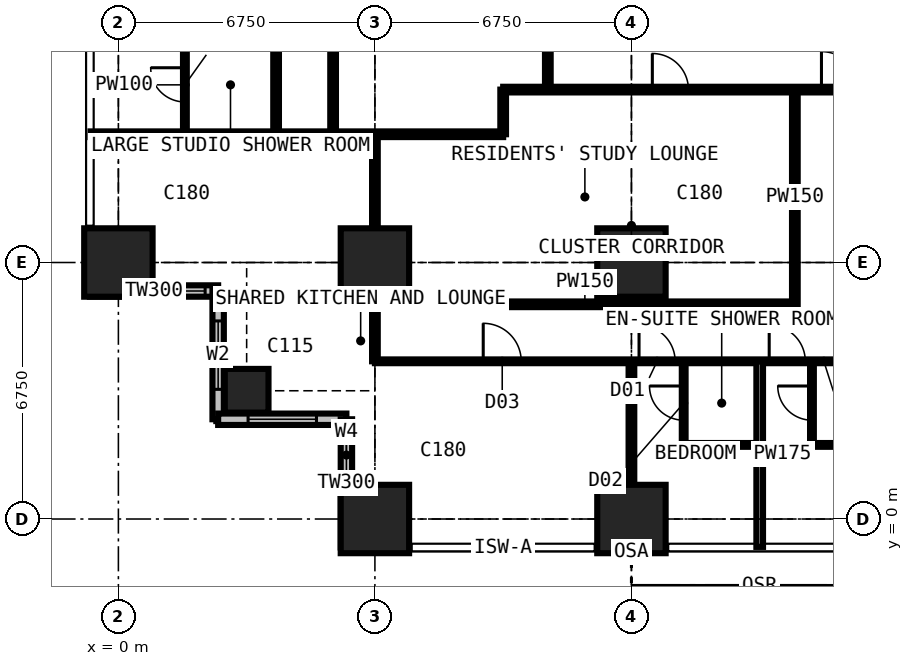
"""IFC4 building model, lengths in metres.
Left out: names, types, materials, properties, quantities, classifications, styles, units other than length and angle.
Written with IfcOpenShell. Run it as: python <this file> out.ifc"""

import sys

from ifc_helpers import new_model, si_unit, direction, frame, frame_2d, origin, origin_2d, place, context, subcontext, project, spatial, rectangle, extrude, element, fill, save


model = new_model("IFC4")
c1 = context("Model", 3, precision=1e-05, world=origin(), true_north=direction((0.0, 1.0)))
c2 = subcontext(c1, "Body", "Model", "MODEL_VIEW")
j1 = project(units=[si_unit("LENGTHUNIT", "METRE"), si_unit("PLANEANGLEUNIT", "RADIAN")], contexts=[c1])
p1 = place(None, origin())
s1 = spatial("IfcSite", under=j1, at=p1, CompositionType="ELEMENT")
p2 = place(p1, origin())
s2 = spatial("IfcBuilding", under=s1, at=p2, CompositionType="ELEMENT")
p3 = place(p2, frame((0.0, 0.0, 57.6)))
s3 = spatial("IfcBuildingStorey", under=s2, at=p3, CompositionType="ELEMENT", Elevation=57.6)
p4 = place(p3, frame((0.0, 6.75, 0.0), z_axis=(0.0, 0.0, 1.0), x_axis=(1.0, 0.0, 0.0)))
e1 = element("IfcColumn", 1, at=p4, inside=s3, PredefinedType="COLUMN", context=c2, shape_type="SweptSolid", body=[
    extrude(rectangle(XDim=1.8, YDim=1.8, at=origin_2d()), origin(), (0.0, 0.0, 1.0), 3.6),
])
p5 = place(p3, frame((3.375, 3.375, 0.0), z_axis=(0.0, 0.0, 1.0), x_axis=(1.0, 0.0, 0.0)))
e2 = element("IfcColumn", 2, at=p5, inside=s3, PredefinedType="COLUMN", context=c2, shape_type="SweptSolid", body=[
    extrude(rectangle(XDim=1.15, YDim=1.15, at=origin_2d()), origin(), (0.0, 0.0, 1.0), 3.6),
])
for number, where, z_axis, x_axis in (
    (3, (6.75, 0.0, 0.0), (0.0, 0.0, 1.0), (1.0, 0.0, 0.0)),
    (4, (6.75, 6.75, 0.0), (0.0, 0.0, 1.0), (1.0, 0.0, 0.0)),
    (5, (13.5, 0.0, 0.0), (0.0, 0.0, 1.0), (1.0, 0.0, 0.0)),
    (6, (13.5, 6.75, 0.0), (0.0, 0.0, 1.0), (1.0, 0.0, 0.0)),
):
    element("IfcColumn", number, at=place(p3, frame(where, z_axis=z_axis, x_axis=x_axis)), inside=s3, PredefinedType="COLUMN", context=c2, shape_type="SweptSolid", body=[
        extrude(rectangle(XDim=1.8, YDim=1.8, at=origin_2d()), origin(), (0.0, 0.0, 1.0), 3.6),
    ])
p6 = place(p3, frame((-0.75, 6.0, 0.0), z_axis=(0.0, 0.0, 1.0), x_axis=(1.0, 0.0, 0.0)))
e7 = element("IfcWall", 7, at=p6, inside=s3, PredefinedType="SOLIDWALL", context=c2, shape_type="SweptSolid", body=[
    extrude(rectangle(XDim=3.375, YDim=0.3, at=frame_2d((1.688, 0.0))), origin(), (0.0, 0.0, 1.0), 3.375),
])
p7 = place(p6, frame((1.833, 0.0, 0.9)))
e8 = element("IfcOpeningElement", 8, at=p7, cuts=e7, PredefinedType="OPENING", context=c2, shape_type="SweptSolid", body=[
    extrude(rectangle(XDim=1.2, YDim=1.8, at=frame_2d((0.6, 0.9))), frame((0.0, 0.16, 0.0), z_axis=(0.0, -1.0, 0.0), x_axis=(1.0, 0.0, 0.0)), (0.0, 0.0, 1.0), 0.32),
])
p8 = place(p3, frame((2.625, 6.0, 0.0), z_axis=(0.0, 0.0, 1.0), x_axis=(0.0, -1.0, 0.0)))
e9 = element("IfcWall", 9, at=p8, inside=s3, PredefinedType="SOLIDWALL", context=c2, shape_type="SweptSolid", body=[
    extrude(rectangle(XDim=3.375, YDim=0.3, at=frame_2d((1.688, 0.0))), origin(), (0.0, 0.0, 1.0), 3.375),
])
p9 = place(p8, frame((0.788, 0.0, 0.6)))
e10 = element("IfcOpeningElement", 10, at=p9, cuts=e9, PredefinedType="OPENING", context=c2, shape_type="SweptSolid", body=[
    extrude(rectangle(XDim=1.8, YDim=2.1, at=frame_2d((0.9, 1.05))), frame((0.0, 0.16, 0.0), z_axis=(0.0, -1.0, 0.0), x_axis=(1.0, 0.0, 0.0)), (0.0, 0.0, 1.0), 0.32),
])
p10 = place(p3, frame((2.625, 2.625, 0.0), z_axis=(0.0, 0.0, 1.0), x_axis=(1.0, 0.0, 0.0)))
e11 = element("IfcWall", 11, at=p10, inside=s3, PredefinedType="SOLIDWALL", context=c2, shape_type="SweptSolid", body=[
    extrude(rectangle(XDim=3.375, YDim=0.3, at=frame_2d((1.688, 0.0))), origin(), (0.0, 0.0, 1.0), 3.375),
])
p11 = place(p10, frame((0.788, 0.0, 0.6)))
e12 = element("IfcOpeningElement", 12, at=p11, cuts=e11, PredefinedType="OPENING", context=c2, shape_type="SweptSolid", body=[
    extrude(rectangle(XDim=1.8, YDim=2.1, at=frame_2d((0.9, 1.05))), frame((0.0, 0.16, 0.0), z_axis=(0.0, -1.0, 0.0), x_axis=(1.0, 0.0, 0.0)), (0.0, 0.0, 1.0), 0.32),
])
p12 = place(p3, frame((6.0, 2.625, 0.0), z_axis=(0.0, 0.0, 1.0), x_axis=(0.0, -1.0, 0.0)))
e13 = element("IfcWall", 13, at=p12, inside=s3, PredefinedType="SOLIDWALL", context=c2, shape_type="SweptSolid", body=[
    extrude(rectangle(XDim=3.375, YDim=0.3, at=frame_2d((1.688, 0.0))), origin(), (0.0, 0.0, 1.0), 3.375),
])
p13 = place(p12, frame((0.343, 0.0, 0.9)))
e14 = element("IfcOpeningElement", 14, at=p13, cuts=e13, PredefinedType="OPENING", context=c2, shape_type="SweptSolid", body=[
    extrude(rectangle(XDim=1.2, YDim=1.8, at=frame_2d((0.6, 0.9))), frame((0.0, 0.16, 0.0), z_axis=(0.0, -1.0, 0.0), x_axis=(1.0, 0.0, 0.0)), (0.0, 0.0, 1.0), 0.32),
])
p14 = place(p3, frame((-0.734, 10.125, 0.0), z_axis=(0.0, 0.0, 1.0), x_axis=(1.0, 0.0, 0.0)))
e15 = element("IfcWall", 15, at=p14, inside=s3, PredefinedType="PARTITIONING", context=c2, shape_type="SweptSolid", body=[
    extrude(rectangle(XDim=10.859, YDim=0.15, at=frame_2d((5.429, 0.0))), origin(), (0.0, 0.0, 1.0), 3.375),
])
p15 = place(p3, frame((1.75, 10.125, 0.0), z_axis=(0.0, 0.0, 1.0), x_axis=(0.0, 1.0, 0.0)))
e16 = element("IfcWall", 16, at=p15, inside=s3, PredefinedType="PARTITIONING", context=c2, shape_type="SweptSolid", body=[
    extrude(rectangle(XDim=2.6, YDim=0.1, at=frame_2d((1.3, 0.0))), origin(), (0.0, 0.0, 1.0), 3.375),
])
p16 = place(p15, frame((0.85, 0.0, 0.0)))
e17 = element("IfcOpeningElement", 17, at=p16, cuts=e16, PredefinedType="OPENING", context=c2, shape_type="SweptSolid", body=[
    extrude(rectangle(XDim=0.9, YDim=2.2, at=frame_2d((0.45, 1.1))), frame((0.0, 0.06, 0.0), z_axis=(0.0, -1.0, 0.0), x_axis=(1.0, 0.0, 0.0)), (0.0, 0.0, 1.0), 0.12),
])
p17 = place(p3, frame((4.15, 10.125, 0.0), z_axis=(0.0, 0.0, 1.0), x_axis=(0.0, 1.0, 0.0)))
e18 = element("IfcWall", 18, at=p17, inside=s3, PredefinedType="PARTITIONING", context=c2, shape_type="SweptSolid", body=[
    extrude(rectangle(XDim=23.625, YDim=0.15, at=frame_2d((11.812, 0.0))), origin(), (0.0, 0.0, 1.0), 3.375),
])
p18 = place(p17, frame((19.775, 0.0, 0.0)))
e19 = element("IfcOpeningElement", 19, at=p18, cuts=e18, PredefinedType="OPENING", context=c2, shape_type="SweptSolid", body=[
    extrude(rectangle(XDim=1.0, YDim=2.2, at=frame_2d((0.5, 1.1))), frame((0.0, 0.085, 0.0), z_axis=(0.0, -1.0, 0.0), x_axis=(1.0, 0.0, 0.0)), (0.0, 0.0, 1.0), 0.17),
])
p19 = place(p17, frame((13.7, 0.0, 0.0)))
e20 = element("IfcOpeningElement", 20, at=p19, cuts=e18, PredefinedType="OPENING", context=c2, shape_type="SweptSolid", body=[
    extrude(rectangle(XDim=0.95, YDim=2.2, at=frame_2d((0.475, 1.1))), frame((0.0, 0.085, 0.0), z_axis=(0.0, -1.0, 0.0), x_axis=(1.0, 0.0, 0.0)), (0.0, 0.0, 1.0), 0.17),
])
p20 = place(p17, frame((4.2, 0.0, 0.0)))
e21 = element("IfcOpeningElement", 21, at=p20, cuts=e18, PredefinedType="OPENING", context=c2, shape_type="SweptSolid", body=[
    extrude(rectangle(XDim=0.95, YDim=2.2, at=frame_2d((0.475, 1.1))), frame((0.0, 0.085, 0.0), z_axis=(0.0, -1.0, 0.0), x_axis=(1.0, 0.0, 0.0)), (0.0, 0.0, 1.0), 0.17),
])
p21 = place(p17, frame((10.95, 0.0, 0.0)))
e22 = element("IfcOpeningElement", 22, at=p21, cuts=e18, PredefinedType="OPENING", context=c2, shape_type="SweptSolid", body=[
    extrude(rectangle(XDim=0.95, YDim=2.2, at=frame_2d((0.475, 1.1))), frame((0.0, 0.085, 0.0), z_axis=(0.0, -1.0, 0.0), x_axis=(1.0, 0.0, 0.0)), (0.0, 0.0, 1.0), 0.17),
])
p22 = place(p3, frame((5.65, 10.125, 0.0), z_axis=(0.0, 0.0, 1.0), x_axis=(0.0, 1.0, 0.0)))
e23 = element("IfcWall", 23, at=p22, inside=s3, PredefinedType="PARTITIONING", context=c2, shape_type="SweptSolid", body=[
    extrude(rectangle(XDim=10.762, YDim=0.15, at=frame_2d((5.381, 0.0))), origin(), (0.0, 0.0, 1.0), 3.375),
])
p23 = place(p22, frame((4.9, 0.0, 0.0)))
e24 = element("IfcOpeningElement", 24, at=p23, cuts=e23, PredefinedType="OPENING", context=c2, shape_type="SweptSolid", body=[
    extrude(rectangle(XDim=0.95, YDim=2.2, at=frame_2d((0.475, 1.1))), frame((0.0, 0.085, 0.0), z_axis=(0.0, -1.0, 0.0), x_axis=(1.0, 0.0, 0.0)), (0.0, 0.0, 1.0), 0.17),
])
p24 = place(p3, frame((6.75, 4.15, 0.0), z_axis=(0.0, 0.0, 1.0), x_axis=(0.0, 1.0, 0.0)))
e25 = element("IfcWall", 25, at=p24, inside=s3, PredefinedType="PARTITIONING", context=c2, shape_type="SweptSolid", body=[
    extrude(rectangle(XDim=5.975, YDim=0.15, at=frame_2d((2.988, 0.0))), origin(), (0.0, 0.0, 1.0), 2.877),
])
p25 = place(p3, frame((6.75, 4.15, 0.0), z_axis=(0.0, 0.0, 1.0), x_axis=(1.0, 0.0, 0.0)))
e26 = element("IfcWall", 26, at=p25, inside=s3, PredefinedType="PARTITIONING", context=c2, shape_type="SweptSolid", body=[
    extrude(rectangle(XDim=23.625, YDim=0.1, at=frame_2d((11.812, 0.0))), origin(), (0.0, 0.0, 1.0), 3.375),
])
p26 = place(p25, frame((2.85, 0.0, 0.0)))
e27 = element("IfcOpeningElement", 27, at=p26, cuts=e26, PredefinedType="OPENING", context=c2, shape_type="SweptSolid", body=[
    extrude(rectangle(XDim=1.0, YDim=2.2, at=frame_2d((0.5, 1.1))), frame((0.0, 0.06, 0.0), z_axis=(0.0, -1.0, 0.0), x_axis=(1.0, 0.0, 0.0)), (0.0, 0.0, 1.0), 0.12),
])
p27 = place(p25, frame((6.95, 0.0, 0.0)))
e28 = element("IfcOpeningElement", 28, at=p27, cuts=e26, PredefinedType="OPENING", context=c2, shape_type="SweptSolid", body=[
    extrude(rectangle(XDim=0.95, YDim=2.2, at=frame_2d((0.475, 1.1))), frame((0.0, 0.06, 0.0), z_axis=(0.0, -1.0, 0.0), x_axis=(1.0, 0.0, 0.0)), (0.0, 0.0, 1.0), 0.12),
])
p28 = place(p25, frame((10.375, 0.0, 0.0)))
e29 = element("IfcOpeningElement", 29, at=p28, cuts=e26, PredefinedType="OPENING", context=c2, shape_type="SweptSolid", body=[
    extrude(rectangle(XDim=0.95, YDim=2.2, at=frame_2d((0.475, 1.1))), frame((0.0, 0.06, 0.0), z_axis=(0.0, -1.0, 0.0), x_axis=(1.0, 0.0, 0.0)), (0.0, 0.0, 1.0), 0.12),
])
p29 = place(p25, frame((18.475, 0.0, 0.0)))
e30 = element("IfcOpeningElement", 30, at=p29, cuts=e26, PredefinedType="OPENING", context=c2, shape_type="SweptSolid", body=[
    extrude(rectangle(XDim=0.95, YDim=2.2, at=frame_2d((0.475, 1.1))), frame((0.0, 0.06, 0.0), z_axis=(0.0, -1.0, 0.0), x_axis=(1.0, 0.0, 0.0)), (0.0, 0.0, 1.0), 0.12),
])
p30 = place(p25, frame((13.7, 0.0, 0.0)))
e31 = element("IfcOpeningElement", 31, at=p30, cuts=e26, PredefinedType="OPENING", context=c2, shape_type="SweptSolid", body=[
    extrude(rectangle(XDim=0.95, YDim=2.2, at=frame_2d((0.475, 1.1))), frame((0.0, 0.06, 0.0), z_axis=(0.0, -1.0, 0.0), x_axis=(1.0, 0.0, 0.0)), (0.0, 0.0, 1.0), 0.12),
])
p31 = place(p3, frame((6.75, 5.65, 0.0), z_axis=(0.0, 0.0, 1.0), x_axis=(1.0, 0.0, 0.0)))
e32 = element("IfcWall", 32, at=p31, inside=s3, PredefinedType="PARTITIONING", context=c2, shape_type="SweptSolid", body=[
    extrude(rectangle(XDim=11.05, YDim=0.15, at=frame_2d((5.525, 0.0))), origin(), (0.0, 0.0, 1.0), 3.375),
])
p32 = place(p3, frame((10.125, 10.125, 0.0), z_axis=(0.0, 0.0, 1.0), x_axis=(0.0, 1.0, 0.0)))
e33 = element("IfcWall", 33, at=p32, inside=s3, PredefinedType="PARTITIONING", context=c2, shape_type="SweptSolid", body=[
    extrude(rectangle(XDim=1.175, YDim=0.15, at=frame_2d((0.587, 0.0))), origin(), (0.0, 0.0, 1.0), 3.375),
])
p33 = place(p3, frame((10.125, 11.3, 0.0), z_axis=(0.0, 0.0, 1.0), x_axis=(1.0, 0.0, 0.0)))
e34 = element("IfcWall", 34, at=p33, inside=s3, PredefinedType="PARTITIONING", context=c2, shape_type="SweptSolid", body=[
    extrude(rectangle(XDim=20.675, YDim=0.15, at=frame_2d((10.337, 0.0))), origin(), (0.0, 0.0, 1.0), 3.375),
])
p34 = place(p33, frame((8.375, 0.0, 0.0)))
e35 = element("IfcOpeningElement", 35, at=p34, cuts=e34, PredefinedType="OPENING", context=c2, shape_type="SweptSolid", body=[
    extrude(rectangle(XDim=1.0, YDim=2.2, at=frame_2d((0.5, 1.1))), frame((0.0, 0.085, 0.0), z_axis=(0.0, -1.0, 0.0), x_axis=(1.0, 0.0, 0.0)), (0.0, 0.0, 1.0), 0.17),
])
p35 = place(p33, frame((10.975, 0.0, 0.0)))
e36 = element("IfcOpeningElement", 36, at=p35, cuts=e34, PredefinedType="OPENING", context=c2, shape_type="SweptSolid", body=[
    extrude(rectangle(XDim=1.0, YDim=2.2, at=frame_2d((0.5, 1.1))), frame((0.0, 0.085, 0.0), z_axis=(0.0, -1.0, 0.0), x_axis=(1.0, 0.0, 0.0)), (0.0, 0.0, 1.0), 0.17),
])
p36 = place(p33, frame((3.925, 0.0, 0.0)))
e37 = element("IfcOpeningElement", 37, at=p36, cuts=e34, PredefinedType="OPENING", context=c2, shape_type="SweptSolid", body=[
    extrude(rectangle(XDim=0.95, YDim=2.2, at=frame_2d((0.475, 1.1))), frame((0.0, 0.085, 0.0), z_axis=(0.0, -1.0, 0.0), x_axis=(1.0, 0.0, 0.0)), (0.0, 0.0, 1.0), 0.17),
])
p37 = place(p3, frame((11.3, 11.3, 0.0), z_axis=(0.0, 0.0, 1.0), x_axis=(0.0, 1.0, 0.0)))
e38 = element("IfcWall", 38, at=p37, inside=s3, PredefinedType="PARTITIONING", context=c2, shape_type="SweptSolid", body=[
    extrude(rectangle(XDim=19.075, YDim=0.15, at=frame_2d((9.538, 0.0))), origin(), (0.0, 0.0, 1.0), 3.375),
])
p38 = place(p37, frame((12.875, 0.0, 0.0)))
e39 = element("IfcOpeningElement", 39, at=p38, cuts=e38, PredefinedType="OPENING", context=c2, shape_type="SweptSolid", body=[
    extrude(rectangle(XDim=1.0, YDim=2.2, at=frame_2d((0.5, 1.1))), frame((0.0, 0.085, 0.0), z_axis=(0.0, -1.0, 0.0), x_axis=(1.0, 0.0, 0.0)), (0.0, 0.0, 1.0), 0.17),
])
p39 = place(p37, frame((10.438, 0.0, 0.0)))
e40 = element("IfcOpeningElement", 40, at=p39, cuts=e38, PredefinedType="OPENING", context=c2, shape_type="SweptSolid", body=[
    extrude(rectangle(XDim=1.0, YDim=2.2, at=frame_2d((0.5, 1.1))), frame((0.0, 0.085, 0.0), z_axis=(0.0, -1.0, 0.0), x_axis=(1.0, 0.0, 0.0)), (0.0, 0.0, 1.0), 0.17),
])
p40 = place(p37, frame((15.675, 0.0, 0.0)))
e41 = element("IfcOpeningElement", 41, at=p40, cuts=e38, PredefinedType="OPENING", context=c2, shape_type="SweptSolid", body=[
    extrude(rectangle(XDim=0.95, YDim=2.2, at=frame_2d((0.475, 1.1))), frame((0.0, 0.085, 0.0), z_axis=(0.0, -1.0, 0.0), x_axis=(1.0, 0.0, 0.0)), (0.0, 0.0, 1.0), 0.17),
])
p41 = place(p3, frame((13.5, -0.734, 0.0), z_axis=(0.0, 0.0, 1.0), x_axis=(0.0, 1.0, 0.0)))
e42 = element("IfcWall", 42, at=p41, inside=s3, PredefinedType="PARTITIONING", context=c2, shape_type="SweptSolid", body=[
    extrude(rectangle(XDim=4.884, YDim=0.15, at=frame_2d((2.442, 0.0))), origin(), (0.0, 0.0, 1.0), 2.61),
])
p42 = place(p3, frame((14.875, 1.95, 0.0), z_axis=(0.0, 0.0, 1.0), x_axis=(0.0, 1.0, 0.0)))
e43 = element("IfcWall", 43, at=p42, inside=s3, PredefinedType="PARTITIONING", context=c2, shape_type="SweptSolid", body=[
    extrude(rectangle(XDim=2.2, YDim=0.1, at=frame_2d((1.1, 0.0))), origin(), (0.0, 0.0, 1.0), 3.375),
])
p43 = place(p42, frame((0.65, 0.0, 0.0)))
e44 = element("IfcOpeningElement", 44, at=p43, cuts=e43, PredefinedType="OPENING", context=c2, shape_type="SweptSolid", body=[
    extrude(rectangle(XDim=0.9, YDim=2.2, at=frame_2d((0.45, 1.1))), frame((0.0, 0.06, 0.0), z_axis=(0.0, -1.0, 0.0), x_axis=(1.0, 0.0, 0.0)), (0.0, 0.0, 1.0), 0.12),
])
p44 = place(p3, frame((14.875, 1.95, 0.0), z_axis=(0.0, 0.0, 1.0), x_axis=(1.0, 0.0, 0.0)))
e45 = element("IfcWall", 45, at=p44, inside=s3, PredefinedType="PARTITIONING", context=c2, shape_type="SweptSolid", body=[
    extrude(rectangle(XDim=2.0, YDim=0.1, at=frame_2d((1.0, 0.0))), origin(), (0.0, 0.0, 1.0), 3.375),
])
p45 = place(p3, frame((16.875, -0.734, 0.0), z_axis=(0.0, 0.0, 1.0), x_axis=(0.0, 1.0, 0.0)))
e46 = element("IfcWall", 46, at=p45, inside=s3, PredefinedType="PARTITIONING", context=c2, shape_type="SweptSolid", body=[
    extrude(rectangle(XDim=4.884, YDim=0.175, at=frame_2d((2.442, 0.0))), origin(), (0.0, 0.0, 1.0), 3.375),
])
p46 = place(p3, frame((17.8, 5.65, 0.0), z_axis=(0.0, 0.0, 1.0), x_axis=(0.0, 1.0, 0.0)))
e47 = element("IfcWall", 47, at=p46, inside=s3, PredefinedType="PARTITIONING", context=c2, shape_type="SweptSolid", body=[
    extrude(rectangle(XDim=5.65, YDim=0.15, at=frame_2d((2.825, 0.0))), origin(), (0.0, 0.0, 1.0), 3.375),
])
p47 = place(p3, frame((18.25, 1.95, 0.0), z_axis=(0.0, 0.0, 1.0), x_axis=(0.0, 1.0, 0.0)))
e48 = element("IfcWall", 48, at=p47, inside=s3, PredefinedType="PARTITIONING", context=c2, shape_type="SweptSolid", body=[
    extrude(rectangle(XDim=2.2, YDim=0.1, at=frame_2d((1.1, 0.0))), origin(), (0.0, 0.0, 1.0), 3.375),
])
p48 = place(p47, frame((0.65, 0.0, 0.0)))
e49 = element("IfcOpeningElement", 49, at=p48, cuts=e48, PredefinedType="OPENING", context=c2, shape_type="SweptSolid", body=[
    extrude(rectangle(XDim=0.9, YDim=2.2, at=frame_2d((0.45, 1.1))), frame((0.0, 0.06, 0.0), z_axis=(0.0, -1.0, 0.0), x_axis=(1.0, 0.0, 0.0)), (0.0, 0.0, 1.0), 0.12),
])
p49 = place(p3, frame((18.25, 1.95, 0.0), z_axis=(0.0, 0.0, 1.0), x_axis=(1.0, 0.0, 0.0)))
e50 = element("IfcWall", 50, at=p49, inside=s3, PredefinedType="PARTITIONING", context=c2, shape_type="SweptSolid", body=[
    extrude(rectangle(XDim=2.0, YDim=0.1, at=frame_2d((1.0, 0.0))), origin(), (0.0, 0.0, 1.0), 3.375),
])
p50 = place(p7, origin())
e51 = element("IfcWindow", 51, at=p50, inside=s3, PartitioningType="SINGLE_PANEL", PredefinedType="WINDOW", context=c2, shape_type="SweptSolid", body=[
    extrude(rectangle(XDim=1.2, YDim=1.8, at=frame_2d((0.6, 0.9))), frame((0.0, 0.03, 0.0), z_axis=(0.0, -1.0, 0.0), x_axis=(1.0, 0.0, 0.0)), (0.0, 0.0, 1.0), 0.06),
])
fill(e8, e51)
p51 = place(p9, origin())
e52 = element("IfcWindow", 52, at=p51, inside=s3, PartitioningType="SINGLE_PANEL", PredefinedType="WINDOW", context=c2, shape_type="SweptSolid", body=[
    extrude(rectangle(XDim=1.8, YDim=2.1, at=frame_2d((0.9, 1.05))), frame((0.0, 0.03, 0.0), z_axis=(0.0, -1.0, 0.0), x_axis=(1.0, 0.0, 0.0)), (0.0, 0.0, 1.0), 0.06),
])
fill(e10, e52)
p52 = place(p11, origin())
e53 = element("IfcWindow", 53, at=p52, inside=s3, PartitioningType="SINGLE_PANEL", PredefinedType="WINDOW", context=c2, shape_type="SweptSolid", body=[
    extrude(rectangle(XDim=1.8, YDim=2.1, at=frame_2d((0.9, 1.05))), frame((0.0, 0.03, 0.0), z_axis=(0.0, -1.0, 0.0), x_axis=(1.0, 0.0, 0.0)), (0.0, 0.0, 1.0), 0.06),
])
fill(e12, e53)
p53 = place(p13, origin())
e54 = element("IfcWindow", 54, at=p53, inside=s3, PartitioningType="SINGLE_PANEL", PredefinedType="WINDOW", context=c2, shape_type="SweptSolid", body=[
    extrude(rectangle(XDim=1.2, YDim=1.8, at=frame_2d((0.6, 0.9))), frame((0.0, 0.03, 0.0), z_axis=(0.0, -1.0, 0.0), x_axis=(1.0, 0.0, 0.0)), (0.0, 0.0, 1.0), 0.06),
])
fill(e14, e54)
p54 = place(p26, origin())
e55 = element("IfcDoor", 55, at=p54, inside=s3, OperationType="SINGLE_SWING_LEFT", PredefinedType="DOOR", context=c2, shape_type="SweptSolid", body=[
    extrude(rectangle(XDim=1.0, YDim=2.2, at=frame_2d((0.5, 1.1))), frame((0.0, 0.025, 0.0), z_axis=(0.0, -1.0, 0.0), x_axis=(1.0, 0.0, 0.0)), (0.0, 0.0, 1.0), 0.05),
])
fill(e27, e55)
p55 = place(p27, origin())
e56 = element("IfcDoor", 56, at=p55, inside=s3, OperationType="SINGLE_SWING_LEFT", PredefinedType="DOOR", context=c2, shape_type="SweptSolid", body=[
    extrude(rectangle(XDim=0.95, YDim=2.2, at=frame_2d((0.475, 1.1))), frame((0.0, 0.025, 0.0), z_axis=(0.0, -1.0, 0.0), x_axis=(1.0, 0.0, 0.0)), (0.0, 0.0, 1.0), 0.05),
])
fill(e28, e56)
p56 = place(p43, origin())
e57 = element("IfcDoor", 57, at=p56, inside=s3, OperationType="SINGLE_SWING_RIGHT", PredefinedType="DOOR", context=c2, shape_type="SweptSolid", body=[
    extrude(rectangle(XDim=0.9, YDim=2.2, at=frame_2d((0.45, 1.1))), frame((0.0, 0.025, 0.0), z_axis=(0.0, -1.0, 0.0), x_axis=(1.0, 0.0, 0.0)), (0.0, 0.0, 1.0), 0.05),
])
fill(e44, e57)
p57 = place(p28, origin())
e58 = element("IfcDoor", 58, at=p57, inside=s3, OperationType="SINGLE_SWING_LEFT", PredefinedType="DOOR", context=c2, shape_type="SweptSolid", body=[
    extrude(rectangle(XDim=0.95, YDim=2.2, at=frame_2d((0.475, 1.1))), frame((0.0, 0.025, 0.0), z_axis=(0.0, -1.0, 0.0), x_axis=(1.0, 0.0, 0.0)), (0.0, 0.0, 1.0), 0.05),
])
fill(e29, e58)
p58 = place(p48, origin())
e59 = element("IfcDoor", 59, at=p58, inside=s3, OperationType="SINGLE_SWING_RIGHT", PredefinedType="DOOR", context=c2, shape_type="SweptSolid", body=[
    extrude(rectangle(XDim=0.9, YDim=2.2, at=frame_2d((0.45, 1.1))), frame((0.0, 0.025, 0.0), z_axis=(0.0, -1.0, 0.0), x_axis=(1.0, 0.0, 0.0)), (0.0, 0.0, 1.0), 0.05),
])
fill(e49, e59)
p59 = place(p34, origin())
e60 = element("IfcDoor", 60, at=p59, inside=s3, OperationType="SINGLE_SWING_LEFT", PredefinedType="DOOR", context=c2, shape_type="SweptSolid", body=[
    extrude(rectangle(XDim=1.0, YDim=2.2, at=frame_2d((0.5, 1.1))), frame((0.0, 0.025, 0.0), z_axis=(0.0, -1.0, 0.0), x_axis=(1.0, 0.0, 0.0)), (0.0, 0.0, 1.0), 0.05),
])
fill(e35, e60)
p60 = place(p36, origin())
e61 = element("IfcDoor", 61, at=p60, inside=s3, OperationType="SINGLE_SWING_LEFT", PredefinedType="DOOR", context=c2, shape_type="SweptSolid", body=[
    extrude(rectangle(XDim=0.95, YDim=2.2, at=frame_2d((0.475, 1.1))), frame((0.0, 0.025, 0.0), z_axis=(0.0, -1.0, 0.0), x_axis=(1.0, 0.0, 0.0)), (0.0, 0.0, 1.0), 0.05),
])
fill(e37, e61)
p61 = place(p16, origin())
e62 = element("IfcDoor", 62, at=p61, inside=s3, OperationType="SINGLE_SWING_RIGHT", PredefinedType="DOOR", context=c2, shape_type="SweptSolid", body=[
    extrude(rectangle(XDim=0.9, YDim=2.2, at=frame_2d((0.45, 1.1))), frame((0.0, 0.025, 0.0), z_axis=(0.0, -1.0, 0.0), x_axis=(1.0, 0.0, 0.0)), (0.0, 0.0, 1.0), 0.05),
])
fill(e17, e62)
save(model, sys.argv[1])
